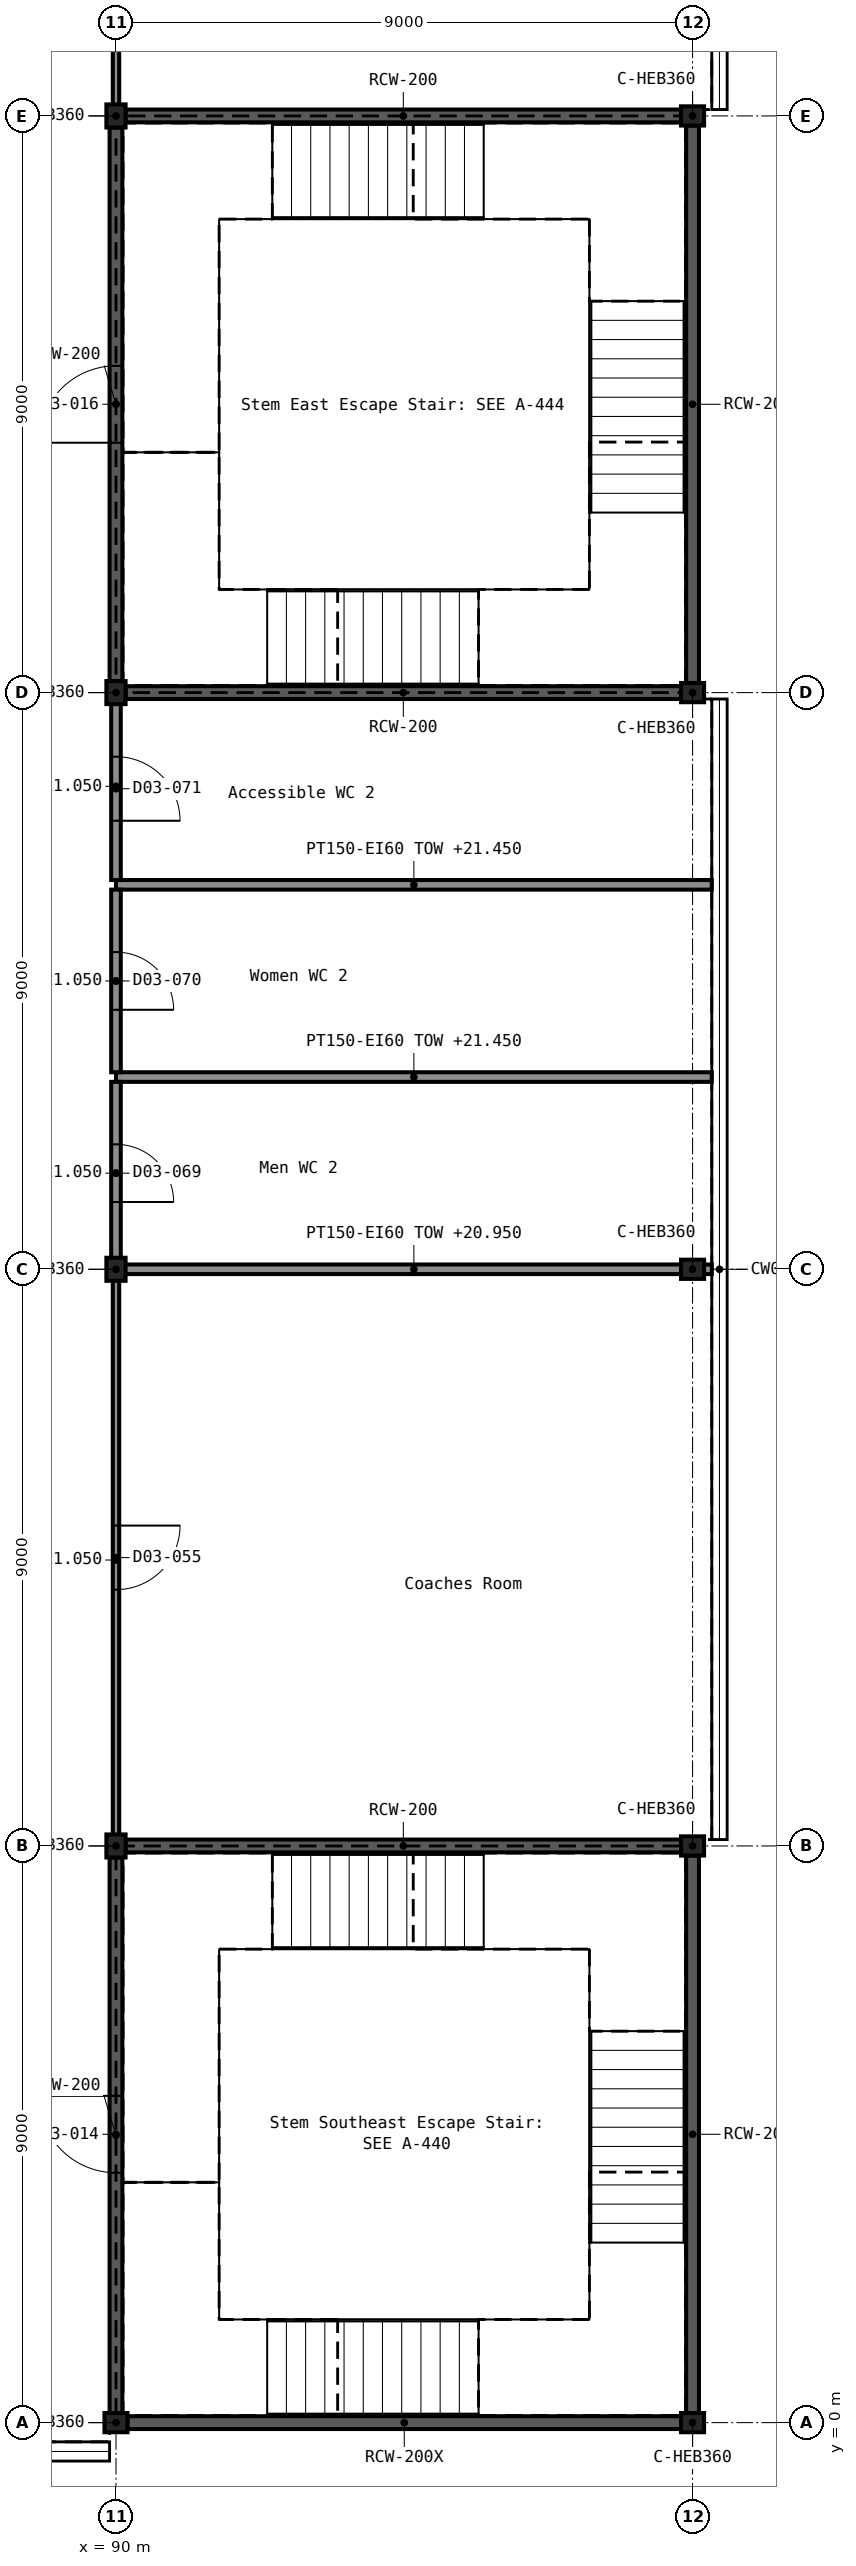
"""IFC4 building model, lengths in metres.
Left out: names, types, materials, properties, quantities, classifications, styles, units other than length and angle.
Written with IfcOpenShell. Run it as: python <this file> out.ifc"""

import sys

from ifc_helpers import new_model, si_unit, direction, frame, frame_2d, origin, origin_2d, place, context, subcontext, project, spatial, rectangle, i_section, extrude, element, fill, save


model = new_model("IFC4")
c1 = context("Model", 3, precision=1e-05, world=origin(), true_north=direction((0.0, 1.0)))
c2 = subcontext(c1, "Body", "Model", "MODEL_VIEW")
j1 = project(units=[si_unit("LENGTHUNIT", "METRE"), si_unit("PLANEANGLEUNIT", "RADIAN")], contexts=[c1])
p1 = place(None, origin())
s1 = spatial("IfcSite", under=j1, at=p1, CompositionType="ELEMENT")
p2 = place(p1, origin())
s2 = spatial("IfcBuilding", under=s1, at=p2, CompositionType="ELEMENT")
p3 = place(p2, frame((0.0, 0.0, 16.2)))
s3 = spatial("IfcBuildingStorey", under=s2, at=p3, CompositionType="ELEMENT", Elevation=16.2)
for number, where, z_axis, x_axis in (
    (1, (90.0, 0.0, 0.0), (0.0, 0.0, 1.0), (0.0, 1.0, 0.0)),
    (2, (99.0, 0.0, 0.0), (0.0, 0.0, 1.0), (0.0, 1.0, 0.0)),
    (3, (90.0, 9.0, 0.0), (0.0, 0.0, 1.0), (1.0, 0.0, 0.0)),
    (4, (99.0, 9.0, 0.0), (0.0, 0.0, 1.0), (0.0, 1.0, 0.0)),
    (5, (90.0, 18.0, 0.0), (0.0, 0.0, 1.0), (1.0, 0.0, 0.0)),
    (6, (99.0, 18.0, 0.0), (0.0, 0.0, 1.0), (0.0, 1.0, 0.0)),
    (7, (90.0, 27.0, 0.0), (0.0, 0.0, 1.0), (1.0, 0.0, 0.0)),
    (8, (99.0, 27.0, 0.0), (0.0, 0.0, 1.0), (0.0, 1.0, 0.0)),
    (9, (90.0, 36.0, 0.0), (0.0, 0.0, 1.0), (1.0, 0.0, 0.0)),
    (10, (99.0, 36.0, 0.0), (0.0, 0.0, 1.0), (0.0, 1.0, 0.0)),
):
    element("IfcColumn", number, at=place(p3, frame(where, z_axis=z_axis, x_axis=x_axis)), inside=s3, PredefinedType="COLUMN", context=c2, shape_type="SweptSolid", body=[
        extrude(i_section(OverallWidth=0.3, OverallDepth=0.36, WebThickness=0.012, FlangeThickness=0.022, FilletRadius=0.027, at=origin_2d()), origin(), (0.0, 0.0, 1.0), 5.4),
    ])
p4 = place(p3, frame((90.18, 0.0, 0.0), z_axis=(0.0, 0.0, 1.0), x_axis=(1.0, 0.0, 0.0)))
e11 = element("IfcWall", 11, at=p4, inside=s3, PredefinedType="SHEAR", context=c2, shape_type="SweptSolid", body=[
    extrude(rectangle(XDim=8.64, YDim=0.2, at=frame_2d((4.32, 0.0))), origin(), (0.0, 0.0, 1.0), 5.4),
])
p5 = place(p3, frame((90.15, 9.0, 0.0), z_axis=(0.0, 0.0, 1.0), x_axis=(1.0, 0.0, 0.0)))
e12 = element("IfcWall", 12, at=p5, inside=s3, PredefinedType="SHEAR", context=c2, shape_type="SweptSolid", body=[
    extrude(rectangle(XDim=8.67, YDim=0.2, at=frame_2d((4.335, 0.0))), origin(), (0.0, 0.0, 1.0), 5.4),
])
p6 = place(p3, frame((90.0, 0.15, 0.0), z_axis=(0.0, 0.0, 1.0), x_axis=(0.0, 1.0, 0.0)))
e13 = element("IfcWall", 13, at=p6, inside=s3, PredefinedType="SHEAR", context=c2, shape_type="SweptSolid", body=[
    extrude(rectangle(XDim=8.67, YDim=0.2, at=frame_2d((4.335, 0.0))), origin(), (0.0, 0.0, 1.0), 5.4),
])
p7 = place(p6, frame((3.75, 0.0, 0.0)))
e14 = element("IfcOpeningElement", 14, at=p7, cuts=e13, PredefinedType="OPENING", context=c2, shape_type="SweptSolid", body=[
    extrude(rectangle(XDim=1.2, YDim=2.1, at=frame_2d((0.6, 1.05))), frame((0.0, 0.111, 0.0), z_axis=(0.0, -1.0, 0.0), x_axis=(1.0, 0.0, 0.0)), (0.0, 0.0, 1.0), 0.222),
])
p8 = place(p3, frame((99.0, 0.15, 0.0), z_axis=(0.0, 0.0, 1.0), x_axis=(0.0, 1.0, 0.0)))
e15 = element("IfcWall", 15, at=p8, inside=s3, PredefinedType="SHEAR", context=c2, shape_type="SweptSolid", body=[
    extrude(rectangle(XDim=8.7, YDim=0.2, at=frame_2d((4.35, 0.0))), origin(), (0.0, 0.0, 1.0), 5.4),
])
for number, where, z_axis, x_axis in (
    (16, (90.15, 27.0, 0.0), (0.0, 0.0, 1.0), (1.0, 0.0, 0.0)),
    (17, (90.15, 36.0, 0.0), (0.0, 0.0, 1.0), (1.0, 0.0, 0.0)),
):
    element("IfcWall", number, at=place(p3, frame(where, z_axis=z_axis, x_axis=x_axis)), inside=s3, PredefinedType="SHEAR", context=c2, shape_type="SweptSolid", body=[
        extrude(rectangle(XDim=8.67, YDim=0.2, at=frame_2d((4.335, 0.0))), origin(), (0.0, 0.0, 1.0), 5.4),
    ])
p9 = place(p3, frame((90.0, 27.18, 0.0), z_axis=(0.0, 0.0, 1.0), x_axis=(0.0, 1.0, 0.0)))
e18 = element("IfcWall", 18, at=p9, inside=s3, PredefinedType="SHEAR", context=c2, shape_type="SweptSolid", body=[
    extrude(rectangle(XDim=8.64, YDim=0.2, at=frame_2d((4.32, 0.0))), origin(), (0.0, 0.0, 1.0), 5.4),
])
p10 = place(p9, frame((3.72, 0.0, 0.0)))
e19 = element("IfcOpeningElement", 19, at=p10, cuts=e18, PredefinedType="OPENING", context=c2, shape_type="SweptSolid", body=[
    extrude(rectangle(XDim=1.2, YDim=2.1, at=frame_2d((0.6, 1.05))), frame((0.0, 0.111, 0.0), z_axis=(0.0, -1.0, 0.0), x_axis=(1.0, 0.0, 0.0)), (0.0, 0.0, 1.0), 0.222),
])
p11 = place(p3, frame((99.0, 27.15, 0.0), z_axis=(0.0, 0.0, 1.0), x_axis=(0.0, 1.0, 0.0)))
e20 = element("IfcWall", 20, at=p11, inside=s3, PredefinedType="SHEAR", context=c2, shape_type="SweptSolid", body=[
    extrude(rectangle(XDim=8.7, YDim=0.2, at=frame_2d((4.35, 0.0))), origin(), (0.0, 0.0, 1.0), 5.4),
])
p12 = place(p3, frame((90.0, 18.0, 0.0), z_axis=(0.0, 0.0, 1.0), x_axis=(1.0, 0.0, 0.0)))
e21 = element("IfcWall", 21, at=p12, inside=s3, PredefinedType="PARTITIONING", context=c2, shape_type="SweptSolid", body=[
    extrude(rectangle(XDim=9.3, YDim=0.15, at=frame_2d((4.65, 0.0))), origin(), (0.0, 0.0, 1.0), 4.75),
])
for number, where, z_axis, x_axis in (
    (22, (90.0, 21.0, 0.0), (0.0, 0.0, 1.0), (1.0, 0.0, 0.0)),
    (23, (90.0, 24.0, 0.0), (0.0, 0.0, 1.0), (1.0, 0.0, 0.0)),
):
    element("IfcWall", number, at=place(p3, frame(where, z_axis=z_axis, x_axis=x_axis)), inside=s3, PredefinedType="PARTITIONING", context=c2, shape_type="SweptSolid", body=[
        extrude(rectangle(XDim=9.3, YDim=0.15, at=frame_2d((4.65, 0.0))), origin(), (0.0, 0.0, 1.0), 5.25),
    ])
p13 = place(p3, frame((90.0, 18.075, 0.0), z_axis=(0.0, 0.0, 1.0), x_axis=(0.0, 1.0, 0.0)))
e24 = element("IfcWall", 24, at=p13, inside=s3, PredefinedType="PARTITIONING", context=c2, shape_type="SweptSolid", body=[
    extrude(rectangle(XDim=2.85, YDim=0.15, at=frame_2d((1.425, 0.0))), origin(), (0.0, 0.0, 1.0), 4.85),
])
p14 = place(p13, frame((0.975, 0.0, 0.0)))
e25 = element("IfcOpeningElement", 25, at=p14, cuts=e24, PredefinedType="OPENING", context=c2, shape_type="SweptSolid", body=[
    extrude(rectangle(XDim=0.9, YDim=2.1, at=frame_2d((0.45, 1.05))), frame((0.0, 0.086, 0.0), z_axis=(0.0, -1.0, 0.0), x_axis=(1.0, 0.0, 0.0)), (0.0, 0.0, 1.0), 0.172),
])
p15 = place(p3, frame((90.0, 21.075, 0.0), z_axis=(0.0, 0.0, 1.0), x_axis=(0.0, 1.0, 0.0)))
e26 = element("IfcWall", 26, at=p15, inside=s3, PredefinedType="PARTITIONING", context=c2, shape_type="SweptSolid", body=[
    extrude(rectangle(XDim=2.85, YDim=0.15, at=frame_2d((1.425, 0.0))), origin(), (0.0, 0.0, 1.0), 4.85),
])
p16 = place(p15, frame((0.975, 0.0, 0.0)))
e27 = element("IfcOpeningElement", 27, at=p16, cuts=e26, PredefinedType="OPENING", context=c2, shape_type="SweptSolid", body=[
    extrude(rectangle(XDim=0.9, YDim=2.1, at=frame_2d((0.45, 1.05))), frame((0.0, 0.086, 0.0), z_axis=(0.0, -1.0, 0.0), x_axis=(1.0, 0.0, 0.0)), (0.0, 0.0, 1.0), 0.172),
])
p17 = place(p3, frame((90.0, 24.075, 0.0), z_axis=(0.0, 0.0, 1.0), x_axis=(0.0, 1.0, 0.0)))
e28 = element("IfcWall", 28, at=p17, inside=s3, PredefinedType="PARTITIONING", context=c2, shape_type="SweptSolid", body=[
    extrude(rectangle(XDim=2.925, YDim=0.15, at=frame_2d((1.462, 0.0))), origin(), (0.0, 0.0, 1.0), 4.85),
])
p18 = place(p17, frame((0.925, 0.0, 0.0)))
e29 = element("IfcOpeningElement", 29, at=p18, cuts=e28, PredefinedType="OPENING", context=c2, shape_type="SweptSolid", body=[
    extrude(rectangle(XDim=1.0, YDim=2.1, at=frame_2d((0.5, 1.05))), frame((0.0, 0.086, 0.0), z_axis=(0.0, -1.0, 0.0), x_axis=(1.0, 0.0, 0.0)), (0.0, 0.0, 1.0), 0.172),
])
p19 = place(p3, frame((90.0, 9.0, 0.0), z_axis=(0.0, 0.0, 1.0), x_axis=(0.0, 1.0, 0.0)))
e30 = element("IfcWall", 30, at=p19, inside=s3, PredefinedType="PARTITIONING", context=c2, shape_type="SweptSolid", body=[
    extrude(rectangle(XDim=8.925, YDim=0.1, at=frame_2d((4.462, 0.0))), origin(), (0.0, 0.0, 1.0), 4.85),
])
p20 = place(p19, frame((4.0, 0.0, 0.0)))
e31 = element("IfcOpeningElement", 31, at=p20, cuts=e30, PredefinedType="OPENING", context=c2, shape_type="SweptSolid", body=[
    extrude(rectangle(XDim=1.0, YDim=2.1, at=frame_2d((0.5, 1.05))), frame((0.0, 0.061, 0.0), z_axis=(0.0, -1.0, 0.0), x_axis=(1.0, 0.0, 0.0)), (0.0, 0.0, 1.0), 0.122),
])
p21 = place(p3, frame((90.0, 36.0, 0.0), z_axis=(0.0, 0.0, 1.0), x_axis=(0.0, 1.0, 0.0)))
e32 = element("IfcWall", 32, at=p21, inside=s3, PredefinedType="PARTITIONING", context=c2, shape_type="SweptSolid", body=[
    extrude(rectangle(XDim=9.0, YDim=0.1, at=frame_2d((4.5, 0.0))), origin(), (0.0, 0.0, 1.0), 4.85),
])
p22 = place(p21, frame((3.6, 0.0, 0.0)))
e33 = element("IfcOpeningElement", 33, at=p22, cuts=e32, PredefinedType="OPENING", context=c2, shape_type="SweptSolid", body=[
    extrude(rectangle(XDim=1.8, YDim=2.1, at=frame_2d((0.9, 1.05))), frame((0.0, 0.061, 0.0), z_axis=(0.0, -1.0, 0.0), x_axis=(1.0, 0.0, 0.0)), (0.0, 0.0, 1.0), 0.122),
])
p23 = place(p7, origin())
e34 = element("IfcDoor", 34, at=p23, inside=s3, OperationType="SINGLE_SWING_RIGHT", PredefinedType="DOOR", context=c2, shape_type="SweptSolid", body=[
    extrude(rectangle(XDim=1.2, YDim=2.1, at=frame_2d((0.6, 1.05))), frame((0.0, 0.025, 0.0), z_axis=(0.0, -1.0, 0.0), x_axis=(1.0, 0.0, 0.0)), (0.0, 0.0, 1.0), 0.05),
])
fill(e14, e34)
p24 = place(p10, origin())
e35 = element("IfcDoor", 35, at=p24, inside=s3, OperationType="SINGLE_SWING_LEFT", PredefinedType="DOOR", context=c2, shape_type="SweptSolid", body=[
    extrude(rectangle(XDim=1.2, YDim=2.1, at=frame_2d((0.6, 1.05))), frame((0.0, 0.025, 0.0), z_axis=(0.0, -1.0, 0.0), x_axis=(1.0, 0.0, 0.0)), (0.0, 0.0, 1.0), 0.05),
])
fill(e19, e35)
p25 = place(p20, frame((1.0, 0.0, 0.0), z_axis=(0.0, 0.0, 1.0), x_axis=(-1.0, 0.0, 0.0)))
e36 = element("IfcDoor", 36, at=p25, inside=s3, OperationType="SINGLE_SWING_LEFT", PredefinedType="DOOR", context=c2, shape_type="SweptSolid", body=[
    extrude(rectangle(XDim=1.0, YDim=2.1, at=frame_2d((0.5, 1.05))), frame((0.0, 0.025, 0.0), z_axis=(0.0, -1.0, 0.0), x_axis=(1.0, 0.0, 0.0)), (0.0, 0.0, 1.0), 0.05),
])
fill(e31, e36)
p26 = place(p14, frame((0.9, 0.0, 0.0), z_axis=(0.0, 0.0, 1.0), x_axis=(-1.0, 0.0, 0.0)))
e37 = element("IfcDoor", 37, at=p26, inside=s3, OperationType="SINGLE_SWING_RIGHT", PredefinedType="DOOR", context=c2, shape_type="SweptSolid", body=[
    extrude(rectangle(XDim=0.9, YDim=2.1, at=frame_2d((0.45, 1.05))), frame((0.0, 0.025, 0.0), z_axis=(0.0, -1.0, 0.0), x_axis=(1.0, 0.0, 0.0)), (0.0, 0.0, 1.0), 0.05),
])
fill(e25, e37)
p27 = place(p16, frame((0.9, 0.0, 0.0), z_axis=(0.0, 0.0, 1.0), x_axis=(-1.0, 0.0, 0.0)))
e38 = element("IfcDoor", 38, at=p27, inside=s3, OperationType="SINGLE_SWING_RIGHT", PredefinedType="DOOR", context=c2, shape_type="SweptSolid", body=[
    extrude(rectangle(XDim=0.9, YDim=2.1, at=frame_2d((0.45, 1.05))), frame((0.0, 0.025, 0.0), z_axis=(0.0, -1.0, 0.0), x_axis=(1.0, 0.0, 0.0)), (0.0, 0.0, 1.0), 0.05),
])
fill(e27, e38)
p28 = place(p18, frame((1.0, 0.0, 0.0), z_axis=(0.0, 0.0, 1.0), x_axis=(-1.0, 0.0, 0.0)))
e39 = element("IfcDoor", 39, at=p28, inside=s3, OperationType="SINGLE_SWING_RIGHT", PredefinedType="DOOR", context=c2, shape_type="SweptSolid", body=[
    extrude(rectangle(XDim=1.0, YDim=2.1, at=frame_2d((0.5, 1.05))), frame((0.0, 0.025, 0.0), z_axis=(0.0, -1.0, 0.0), x_axis=(1.0, 0.0, 0.0)), (0.0, 0.0, 1.0), 0.05),
])
fill(e29, e39)
save(model, sys.argv[1])
